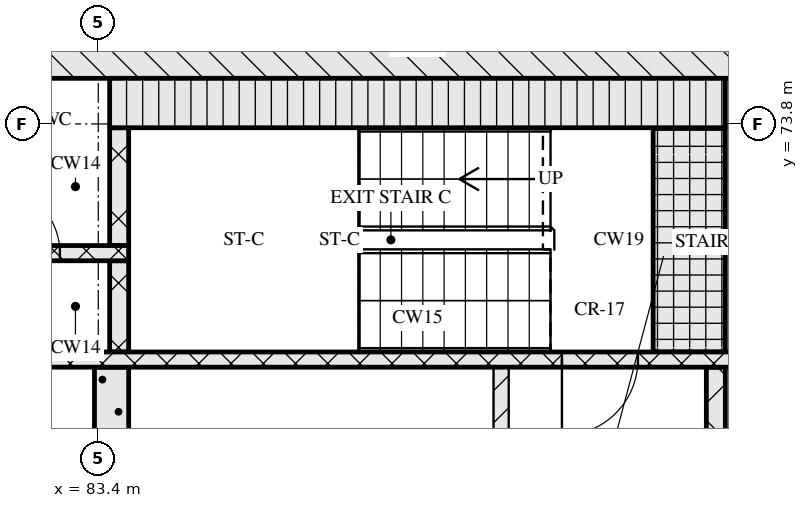
"""IFC4 building model, lengths in metres.
Left out: names, types, materials, properties, quantities, classifications, styles, units other than length and angle.
Written with IfcOpenShell. Run it as: python <this file> out.ifc"""

import sys

from ifc_helpers import new_model, si_unit, direction, frame, frame_2d, origin, place, context, subcontext, project, spatial, rectangle, extrude, element, fill, save


model = new_model("IFC4")
c1 = context("Model", 3, precision=1e-05, world=origin(), true_north=direction((0.0, 1.0)))
c2 = subcontext(c1, "Body", "Model", "MODEL_VIEW")
j1 = project(units=[si_unit("LENGTHUNIT", "METRE"), si_unit("PLANEANGLEUNIT", "RADIAN")], contexts=[c1])
p1 = place(None, origin())
s1 = spatial("IfcSite", under=j1, at=p1, CompositionType="ELEMENT")
p2 = place(p1, origin())
s2 = spatial("IfcBuilding", under=s1, at=p2, CompositionType="ELEMENT")
p3 = place(p2, frame((0.0, 0.0, 190.65)))
s3 = spatial("IfcBuildingStorey", under=s2, at=p3, CompositionType="ELEMENT", Elevation=190.65)
p4 = place(p3, frame((67.0, 74.8, 0.0), z_axis=(0.0, 0.0, 1.0), x_axis=(1.0, 0.0, 0.0)))
e1 = element("IfcWall", 1, at=p4, inside=s3, PredefinedType="SOLIDWALL", context=c2, shape_type="SweptSolid", body=[
    extrude(rectangle(XDim=41.2, YDim=0.8, at=frame_2d((20.6, 0.0))), origin(), (0.0, 0.0, 1.0), 3.3),
])
p5 = place(p3, frame((83.575, 68.0, 0.0), z_axis=(0.0, 0.0, 1.0), x_axis=(0.0, 1.0, 0.0)))
e2 = element("IfcWall", 2, at=p5, inside=s3, PredefinedType="SOLIDWALL", context=c2, shape_type="SweptSolid", body=[
    extrude(rectangle(XDim=2.6, YDim=0.45, at=frame_2d((1.3, 0.0))), origin(), (0.0, 0.0, 1.0), 3.3),
])
p6 = place(p3, frame((88.7, 68.0, 0.0), z_axis=(0.0, 0.0, 1.0), x_axis=(0.0, 1.0, 0.0)))
e3 = element("IfcWall", 3, at=p6, inside=s3, PredefinedType="PARTITIONING", context=c2, shape_type="SweptSolid", body=[
    extrude(rectangle(XDim=2.6, YDim=0.2, at=frame_2d((1.3, 0.0))), origin(), (0.0, 0.0, 1.0), 3.3),
])
p7 = place(p3, frame((91.525, 68.0, 0.0), z_axis=(0.0, 0.0, 1.0), x_axis=(0.0, 1.0, 0.0)))
e4 = element("IfcWall", 4, at=p7, inside=s3, PredefinedType="SOLIDWALL", context=c2, shape_type="SweptSolid", body=[
    extrude(rectangle(XDim=2.6, YDim=0.25, at=frame_2d((1.3, 0.0))), origin(), (0.0, 0.0, 1.0), 3.3),
])
p8 = place(p3, frame((67.8, 70.7, 0.0), z_axis=(0.0, 0.0, 1.0), x_axis=(1.0, 0.0, 0.0)))
e5 = element("IfcWall", 5, at=p8, inside=s3, PredefinedType="SOLIDWALL", context=c2, shape_type="SweptSolid", body=[
    extrude(rectangle(XDim=39.6, YDim=0.2, at=frame_2d((19.8, 0.0))), origin(), (0.0, 0.0, 1.0), 3.3),
])
p9 = place(p8, frame((0.65, 0.0, 0.0)))
e6 = element("IfcOpeningElement", 6, at=p9, cuts=e5, PredefinedType="OPENING", context=c2, shape_type="SweptSolid", body=[
    extrude(rectangle(XDim=1.1, YDim=2.1, at=frame_2d((0.55, 1.05))), frame((0.0, 0.11, 0.0), z_axis=(0.0, -1.0, 0.0), x_axis=(1.0, 0.0, 0.0)), (0.0, 0.0, 1.0), 0.22),
])
p10 = place(p8, frame((3.25, 0.0, 0.0)))
e7 = element("IfcOpeningElement", 7, at=p10, cuts=e5, PredefinedType="OPENING", context=c2, shape_type="SweptSolid", body=[
    extrude(rectangle(XDim=1.1, YDim=2.1, at=frame_2d((0.55, 1.05))), frame((0.0, 0.11, 0.0), z_axis=(0.0, -1.0, 0.0), x_axis=(1.0, 0.0, 0.0)), (0.0, 0.0, 1.0), 0.22),
])
p11 = place(p8, frame((5.9, 0.0, 0.0)))
e8 = element("IfcOpeningElement", 8, at=p11, cuts=e5, PredefinedType="OPENING", context=c2, shape_type="SweptSolid", body=[
    extrude(rectangle(XDim=1.0, YDim=2.1, at=frame_2d((0.5, 1.05))), frame((0.0, 0.11, 0.0), z_axis=(0.0, -1.0, 0.0), x_axis=(1.0, 0.0, 0.0)), (0.0, 0.0, 1.0), 0.22),
])
p12 = place(p8, frame((21.7, 0.0, 0.0)))
e9 = element("IfcOpeningElement", 9, at=p12, cuts=e5, PredefinedType="OPENING", context=c2, shape_type="SweptSolid", body=[
    extrude(rectangle(XDim=1.0, YDim=2.1, at=frame_2d((0.5, 1.05))), frame((0.0, 0.11, 0.0), z_axis=(0.0, -1.0, 0.0), x_axis=(1.0, 0.0, 0.0)), (0.0, 0.0, 1.0), 0.22),
])
p13 = place(p8, frame((32.7, 0.0, 0.0)))
e10 = element("IfcOpeningElement", 10, at=p13, cuts=e5, PredefinedType="OPENING", context=c2, shape_type="SweptSolid", body=[
    extrude(rectangle(XDim=1.0, YDim=2.1, at=frame_2d((0.5, 1.05))), frame((0.0, 0.11, 0.0), z_axis=(0.0, -1.0, 0.0), x_axis=(1.0, 0.0, 0.0)), (0.0, 0.0, 1.0), 0.22),
])
p14 = place(p8, frame((35.25, 0.0, 0.0)))
e11 = element("IfcOpeningElement", 11, at=p14, cuts=e5, PredefinedType="OPENING", context=c2, shape_type="SweptSolid", body=[
    extrude(rectangle(XDim=1.1, YDim=2.1, at=frame_2d((0.55, 1.05))), frame((0.0, 0.11, 0.0), z_axis=(0.0, -1.0, 0.0), x_axis=(1.0, 0.0, 0.0)), (0.0, 0.0, 1.0), 0.22),
])
p15 = place(p8, frame((37.85, 0.0, 0.0)))
e12 = element("IfcOpeningElement", 12, at=p15, cuts=e5, PredefinedType="OPENING", context=c2, shape_type="SweptSolid", body=[
    extrude(rectangle(XDim=1.1, YDim=2.1, at=frame_2d((0.55, 1.05))), frame((0.0, 0.11, 0.0), z_axis=(0.0, -1.0, 0.0), x_axis=(1.0, 0.0, 0.0)), (0.0, 0.0, 1.0), 0.22),
])
p16 = place(p3, frame((83.675, 70.8, 0.0), z_axis=(0.0, 0.0, 1.0), x_axis=(0.0, 1.0, 0.0)))
e13 = element("IfcWall", 13, at=p16, inside=s3, PredefinedType="SOLIDWALL", context=c2, shape_type="SweptSolid", body=[
    extrude(rectangle(XDim=1.2, YDim=0.25, at=frame_2d((0.6, 0.0))), origin(), (0.0, 0.0, 1.0), 3.3),
])
p17 = place(p3, frame((91.175, 70.8, 0.0), z_axis=(0.0, 0.0, 1.0), x_axis=(0.0, 1.0, 0.0)))
e14 = element("IfcWall", 14, at=p17, inside=s3, PredefinedType="SOLIDWALL", context=c2, shape_type="SweptSolid", body=[
    extrude(rectangle(XDim=2.95, YDim=0.95, at=frame_2d((1.475, 0.0))), origin(), (0.0, 0.0, 1.0), 3.3),
])
p18 = place(p3, frame((72.8, 72.1, 0.0), z_axis=(0.0, 0.0, 1.0), x_axis=(1.0, 0.0, 0.0)))
e15 = element("IfcWall", 15, at=p18, inside=s3, PredefinedType="SOLIDWALL", context=c2, shape_type="SweptSolid", body=[
    extrude(rectangle(XDim=11.0, YDim=0.2, at=frame_2d((5.5, 0.0))), origin(), (0.0, 0.0, 1.0), 3.3),
])
p19 = place(p18, frame((1.25, 0.0, 0.0)))
e16 = element("IfcOpeningElement", 16, at=p19, cuts=e15, PredefinedType="OPENING", context=c2, shape_type="SweptSolid", body=[
    extrude(rectangle(XDim=0.9, YDim=2.1, at=frame_2d((0.45, 1.05))), frame((0.0, 0.11, 0.0), z_axis=(0.0, -1.0, 0.0), x_axis=(1.0, 0.0, 0.0)), (0.0, 0.0, 1.0), 0.22),
])
p20 = place(p18, frame((3.85, 0.0, 0.0)))
e17 = element("IfcOpeningElement", 17, at=p20, cuts=e15, PredefinedType="OPENING", context=c2, shape_type="SweptSolid", body=[
    extrude(rectangle(XDim=0.9, YDim=2.1, at=frame_2d((0.45, 1.05))), frame((0.0, 0.11, 0.0), z_axis=(0.0, -1.0, 0.0), x_axis=(1.0, 0.0, 0.0)), (0.0, 0.0, 1.0), 0.22),
])
p21 = place(p18, frame((6.42, 0.0, 0.0)))
e18 = element("IfcOpeningElement", 18, at=p21, cuts=e15, PredefinedType="OPENING", context=c2, shape_type="SweptSolid", body=[
    extrude(rectangle(XDim=0.9, YDim=2.1, at=frame_2d((0.45, 1.05))), frame((0.0, 0.11, 0.0), z_axis=(0.0, -1.0, 0.0), x_axis=(1.0, 0.0, 0.0)), (0.0, 0.0, 1.0), 0.22),
])
p22 = place(p18, frame((9.195, 0.0, 0.0)))
e19 = element("IfcOpeningElement", 19, at=p22, cuts=e15, PredefinedType="OPENING", context=c2, shape_type="SweptSolid", body=[
    extrude(rectangle(XDim=0.9, YDim=2.1, at=frame_2d((0.45, 1.05))), frame((0.0, 0.11, 0.0), z_axis=(0.0, -1.0, 0.0), x_axis=(1.0, 0.0, 0.0)), (0.0, 0.0, 1.0), 0.22),
])
p23 = place(p3, frame((83.675, 72.2, 0.0), z_axis=(0.0, 0.0, 1.0), x_axis=(0.0, 1.0, 0.0)))
e20 = element("IfcWall", 20, at=p23, inside=s3, PredefinedType="SOLIDWALL", context=c2, shape_type="SweptSolid", body=[
    extrude(rectangle(XDim=1.55, YDim=0.25, at=frame_2d((0.775, 0.0))), origin(), (0.0, 0.0, 1.0), 3.3),
])
p24 = place(p3, frame((83.55, 74.075, 0.0), z_axis=(0.0, 0.0, 1.0), x_axis=(1.0, 0.0, 0.0)))
e21 = element("IfcWall", 21, at=p24, inside=s3, PredefinedType="SOLIDWALL", context=c2, shape_type="SweptSolid", body=[
    extrude(rectangle(XDim=8.1, YDim=0.65, at=frame_2d((4.05, 0.0))), origin(), (0.0, 0.0, 1.0), 3.3),
])
p25 = place(p12, origin())
e22 = element("IfcDoor", 22, at=p25, inside=s3, OperationType="SINGLE_SWING_RIGHT", PredefinedType="DOOR", context=c2, shape_type="SweptSolid", body=[
    extrude(rectangle(XDim=1.0, YDim=2.1, at=frame_2d((0.5, 1.05))), frame((0.0, 0.025, 0.0), z_axis=(0.0, -1.0, 0.0), x_axis=(1.0, 0.0, 0.0)), (0.0, 0.0, 1.0), 0.05),
])
fill(e9, e22)
p26 = place(p22, origin())
e23 = element("IfcDoor", 23, at=p26, inside=s3, OperationType="SINGLE_SWING_LEFT", PredefinedType="DOOR", context=c2, shape_type="SweptSolid", body=[
    extrude(rectangle(XDim=0.9, YDim=2.1, at=frame_2d((0.45, 1.05))), frame((0.0, 0.025, 0.0), z_axis=(0.0, -1.0, 0.0), x_axis=(1.0, 0.0, 0.0)), (0.0, 0.0, 1.0), 0.05),
])
fill(e19, e23)
save(model, sys.argv[1])
